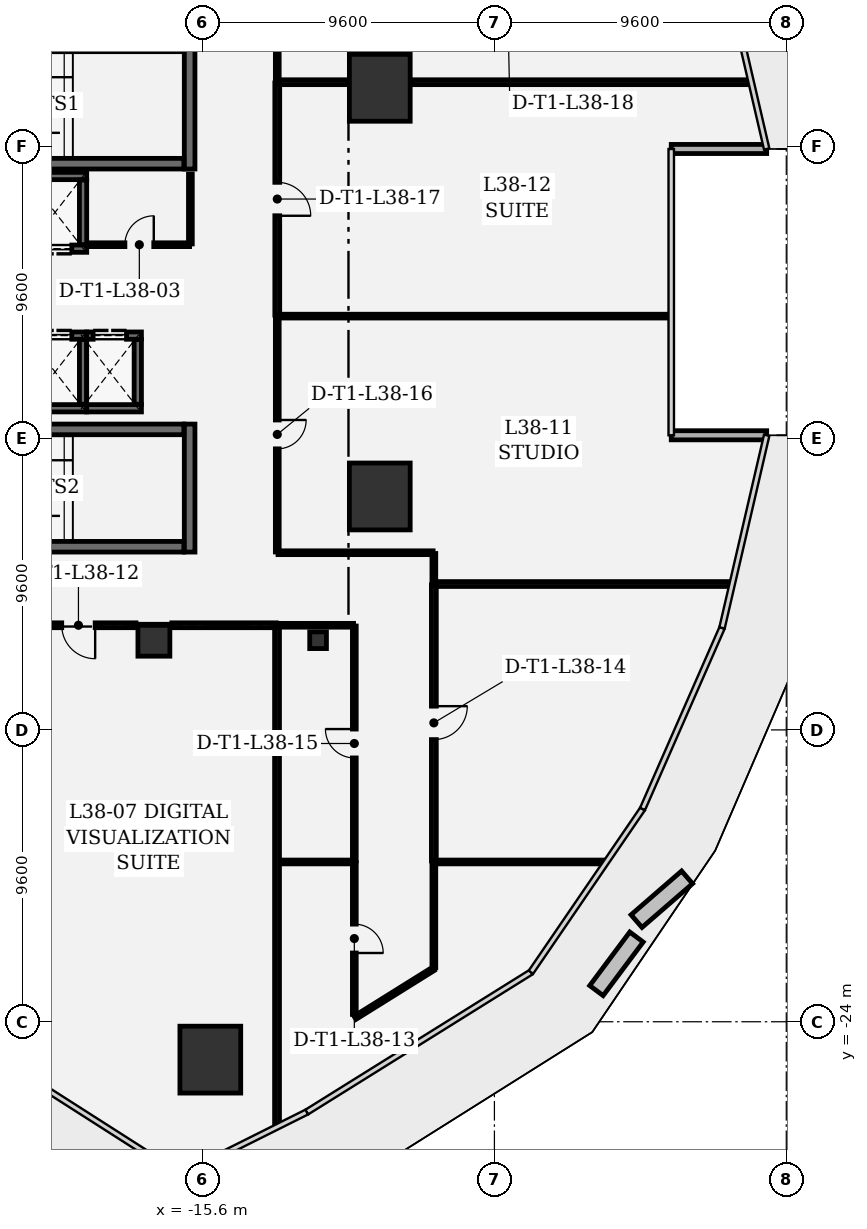
"""IFC4 building model, lengths in metres.
Left out: names, types, materials, properties, quantities, classifications, styles, units other than length and angle.
Written with IfcOpenShell. Run it as: python <this file> out.ifc"""

import sys

from ifc_helpers import new_model, si_unit, direction, frame, frame_2d, origin, origin_2d, place, context, subcontext, project, spatial, rectangle, extrude, element, fill, save


model = new_model("IFC4")
c1 = context("Model", 3, precision=1e-05, world=origin(), true_north=direction((0.0, 1.0)))
c2 = subcontext(c1, "Body", "Model", "MODEL_VIEW")
j1 = project(units=[si_unit("LENGTHUNIT", "METRE"), si_unit("PLANEANGLEUNIT", "RADIAN")], contexts=[c1])
p1 = place(None, origin())
s1 = spatial("IfcSite", under=j1, at=p1, CompositionType="ELEMENT")
p2 = place(p1, origin())
s2 = spatial("IfcBuilding", under=s1, at=p2, CompositionType="ELEMENT")
p3 = place(p2, frame((0.0, 0.0, 166.5)))
s3 = spatial("IfcBuildingStorey", under=s2, at=p3, CompositionType="ELEMENT", Elevation=166.5)
for number, where, z_axis, x_axis in (
    (1, (-15.344, -25.246, 0.0), (0.0, 0.0, 1.0), (1.0, 0.0, 0.0)),
    (2, (-9.77, -6.721, 0.0), (0.0, 0.0, 1.0), (1.0, 0.0, 0.0)),
    (3, (-9.77, 6.721, 0.0), (0.0, 0.0, 1.0), (1.0, 0.0, 0.0)),
):
    element("IfcColumn", number, at=place(p3, frame(where, z_axis=z_axis, x_axis=x_axis)), inside=s3, PredefinedType="COLUMN", context=c2, shape_type="SweptSolid", body=[
        extrude(rectangle(XDim=2.0, YDim=2.2, at=origin_2d()), origin(), (0.0, 0.0, 1.0), 4.05),
    ])
p4 = place(p3, frame((-17.2, -11.45, 0.0), z_axis=(0.0, 0.0, 1.0), x_axis=(1.0, 0.0, 0.0)))
e4 = element("IfcColumn", 4, at=p4, inside=s3, PredefinedType="COLUMN", context=c2, shape_type="SweptSolid", body=[
    extrude(rectangle(XDim=1.05, YDim=1.05, at=origin_2d()), origin(), (0.0, 0.0, 1.0), 4.05),
])
p5 = place(p3, frame((-11.8, -11.45, 0.0), z_axis=(0.0, 0.0, 1.0), x_axis=(1.0, 0.0, 0.0)))
e5 = element("IfcColumn", 5, at=p5, inside=s3, PredefinedType="COLUMN", context=c2, shape_type="SweptSolid", body=[
    extrude(rectangle(XDim=0.55, YDim=0.55, at=origin_2d()), origin(), (0.0, 0.0, 1.0), 4.05),
])
for number, where, z_axis, x_axis in (
    (6, (2.955, -4.709, 0.0), (0.0, 0.0, 1.0), (-1.0, 0.0, 0.0)),
    (7, (-0.184, 4.709, 0.0), (0.0, 0.0, 1.0), (1.0, 0.0, 0.0)),
):
    element("IfcWall", number, at=place(p3, frame(where, z_axis=z_axis, x_axis=x_axis)), inside=s3, PredefinedType="SOLIDWALL", context=c2, shape_type="SweptSolid", body=[
        extrude(rectangle(XDim=3.139, YDim=0.3, at=frame_2d((1.57, 0.0))), origin(), (0.0, 0.0, 1.0), 3.78),
    ])
p6 = place(p3, frame((-16.025, 4.05, 0.0), z_axis=(0.0, 0.0, 1.0), x_axis=(0.0, 1.0, 0.0)))
e8 = element("IfcWall", 8, at=p6, inside=s3, PredefinedType="SHEAR", context=c2, shape_type="SweptSolid", body=[
    extrude(rectangle(XDim=4.21, YDim=0.35, at=frame_2d((2.105, 0.0))), origin(), (0.0, 0.0, 1.0), 3.78),
])
p7 = place(p3, frame((-24.335, 4.225, 0.0), z_axis=(0.0, 0.0, 1.0), x_axis=(1.0, 0.0, 0.0)))
e9 = element("IfcWall", 9, at=p7, inside=s3, PredefinedType="SHEAR", context=c2, shape_type="SweptSolid", body=[
    extrude(rectangle(XDim=8.12, YDim=0.35, at=frame_2d((4.06, 0.0))), origin(), (0.0, 0.0, 1.0), 3.78),
])
p8 = place(p3, frame((-16.025, -8.55, 0.0), z_axis=(0.0, 0.0, 1.0), x_axis=(0.0, 1.0, 0.0)))
e10 = element("IfcWall", 10, at=p8, inside=s3, PredefinedType="SHEAR", context=c2, shape_type="SweptSolid", body=[
    extrude(rectangle(XDim=4.21, YDim=0.35, at=frame_2d((2.105, 0.0))), origin(), (0.0, 0.0, 1.0), 3.78),
])
p9 = place(p3, frame((-24.335, -8.375, 0.0), z_axis=(0.0, 0.0, 1.0), x_axis=(1.0, 0.0, 0.0)))
e11 = element("IfcWall", 11, at=p9, inside=s3, PredefinedType="SHEAR", context=c2, shape_type="SweptSolid", body=[
    extrude(rectangle(XDim=8.12, YDim=0.35, at=frame_2d((4.06, 0.0))), origin(), (0.0, 0.0, 1.0), 3.78),
])
p10 = place(p9, frame((0.28, 0.0, 0.0)))
e12 = element("IfcOpeningElement", 12, at=p10, cuts=e11, PredefinedType="OPENING", context=c2, shape_type="SweptSolid", body=[
    extrude(rectangle(XDim=1.1, YDim=2.2, at=frame_2d((0.55, 1.1))), frame((0.0, 0.185, 0.0), z_axis=(0.0, -1.0, 0.0), x_axis=(1.0, 0.0, 0.0)), (0.0, 0.0, 1.0), 0.37),
])
p11 = place(p3, frame((-16.215, -4.515, 0.0), z_axis=(0.0, 0.0, 1.0), x_axis=(-1.0, 0.0, 0.0)))
e13 = element("IfcWall", 13, at=p11, inside=s3, PredefinedType="SHEAR", context=c2, shape_type="SweptSolid", body=[
    extrude(rectangle(XDim=8.12, YDim=0.35, at=frame_2d((4.06, 0.0))), origin(), (0.0, 0.0, 1.0), 3.78),
])
p12 = place(p3, frame((-19.41, 1.43, 0.0), z_axis=(0.0, 0.0, 1.0), x_axis=(-1.0, 0.0, 0.0)))
e14 = element("IfcWall", 14, at=p12, inside=s3, PredefinedType="SHEAR", context=c2, shape_type="SweptSolid", body=[
    extrude(rectangle(XDim=2.08, YDim=0.24, at=frame_2d((1.04, 0.0))), origin(), (0.0, 0.0, 1.0), 3.78),
])
p13 = place(p12, frame((0.49, 0.0, 0.0)))
e15 = element("IfcOpeningElement", 15, at=p13, cuts=e14, PredefinedType="OPENING", context=c2, shape_type="SweptSolid", body=[
    extrude(rectangle(XDim=1.1, YDim=2.2, at=frame_2d((0.55, 1.1))), frame((0.0, 0.13, 0.0), z_axis=(0.0, -1.0, 0.0), x_axis=(1.0, 0.0, 0.0)), (0.0, 0.0, 1.0), 0.26),
])
p14 = place(p3, frame((-21.49, 3.82, 0.0), z_axis=(0.0, 0.0, 1.0), x_axis=(1.0, 0.0, 0.0)))
e16 = element("IfcWall", 16, at=p14, inside=s3, PredefinedType="SHEAR", context=c2, shape_type="SweptSolid", body=[
    extrude(rectangle(XDim=2.08, YDim=0.24, at=frame_2d((1.04, 0.0))), origin(), (0.0, 0.0, 1.0), 3.78),
])
p15 = place(p3, frame((-19.53, 3.688, 0.0), z_axis=(0.0, 0.0, 1.0), x_axis=(0.0, -1.0, 0.0)))
e17 = element("IfcWall", 17, at=p15, inside=s3, PredefinedType="SHEAR", context=c2, shape_type="SweptSolid", body=[
    extrude(rectangle(XDim=2.126, YDim=0.24, at=frame_2d((1.063, 0.0))), origin(), (0.0, 0.0, 1.0), 3.78),
])
p16 = place(p3, frame((-19.41, -3.82, 0.0), z_axis=(0.0, 0.0, 1.0), x_axis=(-1.0, 0.0, 0.0)))
e18 = element("IfcWall", 18, at=p16, inside=s3, PredefinedType="SHEAR", context=c2, shape_type="SweptSolid", body=[
    extrude(rectangle(XDim=2.08, YDim=0.24, at=frame_2d((1.04, 0.0))), origin(), (0.0, 0.0, 1.0), 3.78),
])
p17 = place(p3, frame((-21.49, -1.43, 0.0), z_axis=(0.0, 0.0, 1.0), x_axis=(1.0, 0.0, 0.0)))
e19 = element("IfcWall", 19, at=p17, inside=s3, PredefinedType="SHEAR", context=c2, shape_type="SweptSolid", body=[
    extrude(rectangle(XDim=2.08, YDim=0.24, at=frame_2d((1.04, 0.0))), origin(), (0.0, 0.0, 1.0), 3.78),
])
p18 = place(p17, frame((0.49, 0.0, 0.0)))
e20 = element("IfcOpeningElement", 20, at=p18, cuts=e19, PredefinedType="OPENING", context=c2, shape_type="SweptSolid", body=[
    extrude(rectangle(XDim=1.1, YDim=2.2, at=frame_2d((0.55, 1.1))), frame((0.0, 0.13, 0.0), z_axis=(0.0, -1.0, 0.0), x_axis=(1.0, 0.0, 0.0)), (0.0, 0.0, 1.0), 0.26),
])
p19 = place(p3, frame((-19.53, -1.562, 0.0), z_axis=(0.0, 0.0, 1.0), x_axis=(0.0, -1.0, 0.0)))
e21 = element("IfcWall", 21, at=p19, inside=s3, PredefinedType="SHEAR", context=c2, shape_type="SweptSolid", body=[
    extrude(rectangle(XDim=2.126, YDim=0.24, at=frame_2d((1.063, 0.0))), origin(), (0.0, 0.0, 1.0), 3.78),
])
p20 = place(p3, frame((-17.61, -3.82, 0.0), z_axis=(0.0, 0.0, 1.0), x_axis=(-1.0, 0.0, 0.0)))
e22 = element("IfcWall", 22, at=p20, inside=s3, PredefinedType="SHEAR", context=c2, shape_type="SweptSolid", body=[
    extrude(rectangle(XDim=1.8, YDim=0.24, at=frame_2d((0.9, 0.0))), origin(), (0.0, 0.0, 1.0), 3.78),
])
p21 = place(p3, frame((-19.41, -1.43, 0.0), z_axis=(0.0, 0.0, 1.0), x_axis=(1.0, 0.0, 0.0)))
e23 = element("IfcWall", 23, at=p21, inside=s3, PredefinedType="SHEAR", context=c2, shape_type="SweptSolid", body=[
    extrude(rectangle(XDim=1.8, YDim=0.24, at=frame_2d((0.9, 0.0))), origin(), (0.0, 0.0, 1.0), 3.78),
])
p22 = place(p21, frame((0.21, 0.0, 0.0)))
e24 = element("IfcOpeningElement", 24, at=p22, cuts=e23, PredefinedType="OPENING", context=c2, shape_type="SweptSolid", body=[
    extrude(rectangle(XDim=1.1, YDim=2.2, at=frame_2d((0.55, 1.1))), frame((0.0, 0.13, 0.0), z_axis=(0.0, -1.0, 0.0), x_axis=(1.0, 0.0, 0.0)), (0.0, 0.0, 1.0), 0.26),
])
p23 = place(p3, frame((-17.73, -1.562, 0.0), z_axis=(0.0, 0.0, 1.0), x_axis=(0.0, -1.0, 0.0)))
e25 = element("IfcWall", 25, at=p23, inside=s3, PredefinedType="SHEAR", context=c2, shape_type="SweptSolid", body=[
    extrude(rectangle(XDim=2.126, YDim=0.24, at=frame_2d((1.063, 0.0))), origin(), (0.0, 0.0, 1.0), 3.78),
])
p24 = place(p3, frame((-19.334, 1.56, 0.0), z_axis=(0.0, 0.0, 1.0), x_axis=(1.0, 0.0, 0.0)))
e26 = element("IfcWall", 26, at=p24, inside=s3, PredefinedType="PARTITIONING", context=c2, shape_type="SweptSolid", body=[
    extrude(rectangle(XDim=3.309, YDim=0.125, at=frame_2d((1.654, 0.0))), origin(), (0.0, 0.0, 1.0), 3.78),
])
p25 = place(p24, frame((1.179, 0.0, 0.0)))
e27 = element("IfcOpeningElement", 27, at=p25, cuts=e26, PredefinedType="OPENING", context=c2, shape_type="SweptSolid", body=[
    extrude(rectangle(XDim=0.95, YDim=2.15, at=frame_2d((0.475, 1.075))), frame((0.0, 0.073, 0.0), z_axis=(0.0, -1.0, 0.0), x_axis=(1.0, 0.0, 0.0)), (0.0, 0.0, 1.0), 0.145),
])
p26 = place(p3, frame((-16.0, 1.585, 0.0), z_axis=(0.0, 0.0, 1.0), x_axis=(0.0, 1.0, 0.0)))
e28 = element("IfcWall", 28, at=p26, inside=s3, PredefinedType="PARTITIONING", context=c2, shape_type="SweptSolid", body=[
    extrude(rectangle(XDim=2.302, YDim=0.125, at=frame_2d((1.151, 0.0))), origin(), (0.0, 0.0, 1.0), 3.78),
])
p27 = place(p3, frame((-17.79, -10.958, 0.0), z_axis=(0.0, 0.0, 1.0), x_axis=(-1.0, 0.0, 0.0)))
e29 = element("IfcWall", 29, at=p27, inside=s3, PredefinedType="PARTITIONING", context=c2, shape_type="SweptSolid", body=[
    extrude(rectangle(XDim=3.783, YDim=0.16, at=frame_2d((1.892, 0.0))), origin(), (0.0, 0.0, 1.0), 3.78),
])
p28 = place(p27, frame((1.342, 0.0, 0.0)))
e30 = element("IfcOpeningElement", 30, at=p28, cuts=e29, PredefinedType="OPENING", context=c2, shape_type="SweptSolid", body=[
    extrude(rectangle(XDim=1.1, YDim=2.15, at=frame_2d((0.55, 1.075))), frame((0.0, 0.09, 0.0), z_axis=(0.0, -1.0, 0.0), x_axis=(1.0, 0.0, 0.0)), (0.0, 0.0, 1.0), 0.18),
])
p29 = place(p3, frame((-13.15, -27.379, 0.0), z_axis=(0.0, 0.0, 1.0), x_axis=(0.0, 1.0, 0.0)))
e31 = element("IfcWall", 31, at=p29, inside=s3, PredefinedType="PARTITIONING", context=c2, shape_type="SweptSolid", body=[
    extrude(rectangle(XDim=16.396, YDim=0.16, at=frame_2d((8.198, 0.0))), origin(), (0.0, 0.0, 1.0), 2.9),
])
p30 = place(p3, frame((-13.175, -10.958, 0.0), z_axis=(0.0, 0.0, 1.0), x_axis=(-1.0, 0.0, 0.0)))
e32 = element("IfcWall", 32, at=p30, inside=s3, PredefinedType="PARTITIONING", context=c2, shape_type="SweptSolid", body=[
    extrude(rectangle(XDim=3.435, YDim=0.16, at=frame_2d((1.718, 0.0))), origin(), (0.0, 0.0, 1.0), 2.895),
])
p31 = place(p3, frame((-2.4, -18.744, 0.0), z_axis=(0.0, 0.0, 1.0), x_axis=(-1.0, 0.0, 0.0)))
e33 = element("IfcWall", 33, at=p31, inside=s3, PredefinedType="PARTITIONING", context=c2, shape_type="SweptSolid", body=[
    extrude(rectangle(XDim=5.567, YDim=0.125, at=frame_2d((2.783, 0.0))), origin(), (0.0, 0.0, 1.0), 3.78),
])
p32 = place(p3, frame((-7.992, -22.226, 0.0), z_axis=(0.0, 0.0, 1.0), x_axis=(0.0, 1.0, 0.0)))
e34 = element("IfcWall", 34, at=p32, inside=s3, PredefinedType="PARTITIONING", context=c2, shape_type="SweptSolid", body=[
    extrude(rectangle(XDim=3.457, YDim=0.125, at=frame_2d((1.728, 0.0))), origin(), (0.0, 0.0, 1.0), 3.78),
])
p33 = place(p3, frame((-10.587, -23.87, 0.0), z_axis=(0.0, 0.0, 1.0), x_axis=(0.848364341402, 0.529412829688, 0.0)))
e35 = element("IfcWall", 35, at=p33, inside=s3, PredefinedType="PARTITIONING", context=c2, shape_type="SweptSolid", body=[
    extrude(rectangle(XDim=3.033, YDim=0.125, at=frame_2d((1.517, 0.0))), origin(), (0.0, 0.0, 1.0), 3.78),
])
p34 = place(p3, frame((-10.608, -18.769, 0.0), z_axis=(0.0, 0.0, 1.0), x_axis=(0.0, -1.0, 0.0)))
e36 = element("IfcWall", 36, at=p34, inside=s3, PredefinedType="PARTITIONING", context=c2, shape_type="SweptSolid", body=[
    extrude(rectangle(XDim=4.989, YDim=0.125, at=frame_2d((2.494, 0.0))), origin(), (0.0, 0.0, 1.0), 3.78),
])
p35 = place(p34, frame((2.019, 0.0, 0.0)))
e37 = element("IfcOpeningElement", 37, at=p35, cuts=e36, PredefinedType="OPENING", context=c2, shape_type="SweptSolid", body=[
    extrude(rectangle(XDim=0.95, YDim=2.15, at=frame_2d((0.475, 1.075))), frame((0.0, 0.073, 0.0), z_axis=(0.0, -1.0, 0.0), x_axis=(1.0, 0.0, 0.0)), (0.0, 0.0, 1.0), 0.145),
])
p36 = place(p3, frame((-10.633, -18.744, 0.0), z_axis=(0.0, 0.0, 1.0), x_axis=(-1.0, 0.0, 0.0)))
e38 = element("IfcWall", 38, at=p36, inside=s3, PredefinedType="PARTITIONING", context=c2, shape_type="SweptSolid", body=[
    extrude(rectangle(XDim=2.407, YDim=0.125, at=frame_2d((1.204, 0.0))), origin(), (0.0, 0.0, 1.0), 3.78),
])
p37 = place(p3, frame((1.741, -9.602, 0.0), z_axis=(0.0, 0.0, 1.0), x_axis=(-1.0, 0.0, 0.0)))
e39 = element("IfcWall", 39, at=p37, inside=s3, PredefinedType="PARTITIONING", context=c2, shape_type="SweptSolid", body=[
    extrude(rectangle(XDim=9.708, YDim=0.16, at=frame_2d((4.854, 0.0))), origin(), (0.0, 0.0, 1.0), 3.78),
])
p38 = place(p3, frame((-7.992, -9.627, 0.0), z_axis=(0.0, 0.0, 1.0), x_axis=(0.0, -1.0, 0.0)))
e40 = element("IfcWall", 40, at=p38, inside=s3, PredefinedType="PARTITIONING", context=c2, shape_type="SweptSolid", body=[
    extrude(rectangle(XDim=9.084, YDim=0.16, at=frame_2d((4.542, 0.0))), origin(), (0.0, 0.0, 1.0), 3.78),
])
p39 = place(p38, frame((3.992, 0.0, 0.0)))
e41 = element("IfcOpeningElement", 41, at=p39, cuts=e40, PredefinedType="OPENING", context=c2, shape_type="SweptSolid", body=[
    extrude(rectangle(XDim=1.1, YDim=2.15, at=frame_2d((0.55, 1.075))), frame((0.0, 0.09, 0.0), z_axis=(0.0, -1.0, 0.0), x_axis=(1.0, 0.0, 0.0)), (0.0, 0.0, 1.0), 0.18),
])
p40 = place(p3, frame((-10.608, -18.711, 0.0), z_axis=(0.0, 0.0, 1.0), x_axis=(0.0, 1.0, 0.0)))
e42 = element("IfcWall", 42, at=p40, inside=s3, PredefinedType="PARTITIONING", context=c2, shape_type="SweptSolid", body=[
    extrude(rectangle(XDim=7.728, YDim=0.125, at=frame_2d((3.864, 0.0))), origin(), (0.0, 0.0, 1.0), 2.9),
])
p41 = place(p40, frame((3.389, 0.0, 0.0)))
e43 = element("IfcOpeningElement", 43, at=p41, cuts=e42, PredefinedType="OPENING", context=c2, shape_type="SweptSolid", body=[
    extrude(rectangle(XDim=0.95, YDim=2.15, at=frame_2d((0.475, 1.075))), frame((0.0, 0.073, 0.0), z_axis=(0.0, -1.0, 0.0), x_axis=(1.0, 0.0, 0.0)), (0.0, 0.0, 1.0), 0.145),
])
p42 = place(p3, frame((-10.633, -10.958, 0.0), z_axis=(0.0, 0.0, 1.0), x_axis=(-1.0, 0.0, 0.0)))
e44 = element("IfcWall", 44, at=p42, inside=s3, PredefinedType="PARTITIONING", context=c2, shape_type="SweptSolid", body=[
    extrude(rectangle(XDim=2.484, YDim=0.125, at=frame_2d((1.242, 0.0))), origin(), (0.0, 0.0, 1.0), 3.78),
])
p43 = place(p3, frame((-0.264, -0.789, 0.0), z_axis=(0.0, 0.0, 1.0), x_axis=(-1.0, 0.0, 0.0)))
e45 = element("IfcWall", 45, at=p43, inside=s3, PredefinedType="PARTITIONING", context=c2, shape_type="SweptSolid", body=[
    extrude(rectangle(XDim=12.853, YDim=0.125, at=frame_2d((6.427, 0.0))), origin(), (0.0, 0.0, 1.0), 3.78),
])
p44 = place(p3, frame((-13.142, -0.814, 0.0), z_axis=(0.0, 0.0, 1.0), x_axis=(0.0, -1.0, 0.0)))
e46 = element("IfcWall", 46, at=p44, inside=s3, PredefinedType="PARTITIONING", context=c2, shape_type="SweptSolid", body=[
    extrude(rectangle(XDim=7.733, YDim=0.125, at=frame_2d((3.866, 0.0))), origin(), (0.0, 0.0, 1.0), 3.78),
])
p45 = place(p44, frame((3.391, 0.0, 0.0)))
e47 = element("IfcOpeningElement", 47, at=p45, cuts=e46, PredefinedType="OPENING", context=c2, shape_type="SweptSolid", body=[
    extrude(rectangle(XDim=0.95, YDim=2.15, at=frame_2d((0.475, 1.075))), frame((0.0, 0.073, 0.0), z_axis=(0.0, -1.0, 0.0), x_axis=(1.0, 0.0, 0.0)), (0.0, 0.0, 1.0), 0.145),
])
p46 = place(p3, frame((-13.117, -8.572, 0.0), z_axis=(0.0, 0.0, 1.0), x_axis=(1.0, 0.0, 0.0)))
e48 = element("IfcWall", 48, at=p46, inside=s3, PredefinedType="PARTITIONING", context=c2, shape_type="SweptSolid", body=[
    extrude(rectangle(XDim=5.1, YDim=0.125, at=frame_2d((2.55, 0.0))), origin(), (0.0, 0.0, 1.0), 2.895),
])
p47 = place(p3, frame((-7.992, -8.597, 0.0), z_axis=(0.0, 0.0, 1.0), x_axis=(0.0, -1.0, 0.0)))
e49 = element("IfcWall", 49, at=p47, inside=s3, PredefinedType="PARTITIONING", context=c2, shape_type="SweptSolid", body=[
    extrude(rectangle(XDim=0.972, YDim=0.125, at=frame_2d((0.486, 0.0))), origin(), (0.0, 0.0, 1.0), 3.78),
])
p48 = place(p3, frame((2.366, 6.905, 0.0), z_axis=(0.0, 0.0, 1.0), x_axis=(-1.0, 0.0, 0.0)))
e50 = element("IfcWall", 50, at=p48, inside=s3, PredefinedType="PARTITIONING", context=c2, shape_type="SweptSolid", body=[
    extrude(rectangle(XDim=11.072, YDim=0.16, at=frame_2d((5.536, 0.0))), origin(), (0.0, 0.0, 1.0), 3.78),
])
p49 = place(p3, frame((-10.835, 6.905, 0.0), z_axis=(0.0, 0.0, 1.0), x_axis=(-1.0, 0.0, 0.0)))
e51 = element("IfcWall", 51, at=p49, inside=s3, PredefinedType="PARTITIONING", context=c2, shape_type="SweptSolid", body=[
    extrude(rectangle(XDim=2.282, YDim=0.16, at=frame_2d((1.141, 0.0))), origin(), (0.0, 0.0, 1.0), 3.78),
])
p50 = place(p3, frame((-13.142, 6.88, 0.0), z_axis=(0.0, 0.0, 1.0), x_axis=(0.0, -1.0, 0.0)))
e52 = element("IfcWall", 52, at=p50, inside=s3, PredefinedType="PARTITIONING", context=c2, shape_type="SweptSolid", body=[
    extrude(rectangle(XDim=7.636, YDim=0.16, at=frame_2d((3.818, 0.0))), origin(), (0.0, 0.0, 1.0), 3.78),
])
p51 = place(p50, frame((3.268, 0.0, 0.0)))
e53 = element("IfcOpeningElement", 53, at=p51, cuts=e52, PredefinedType="OPENING", context=c2, shape_type="SweptSolid", body=[
    extrude(rectangle(XDim=1.1, YDim=2.15, at=frame_2d((0.55, 1.075))), frame((0.0, 0.09, 0.0), z_axis=(0.0, -1.0, 0.0), x_axis=(1.0, 0.0, 0.0)), (0.0, 0.0, 1.0), 0.18),
])
p52 = place(p3, frame((-13.142, 8.287, 0.0), z_axis=(0.0, 0.0, 1.0), x_axis=(0.0, -1.0, 0.0)))
e54 = element("IfcWall", 54, at=p52, inside=s3, PredefinedType="PARTITIONING", context=c2, shape_type="SweptSolid", body=[
    extrude(rectangle(XDim=1.349, YDim=0.125, at=frame_2d((0.674, 0.0))), origin(), (0.0, 0.0, 1.0), 3.78),
])
p53 = place(p13, origin())
e55 = element("IfcDoor", 55, at=p53, inside=s3, OperationType="DOUBLE_DOOR_SLIDING", PredefinedType="DOOR", context=c2, shape_type="SweptSolid", body=[
    extrude(rectangle(XDim=1.1, YDim=2.2, at=frame_2d((0.55, 1.1))), frame((0.0, 0.025, 0.0), z_axis=(0.0, -1.0, 0.0), x_axis=(1.0, 0.0, 0.0)), (0.0, 0.0, 1.0), 0.05),
])
fill(e15, e55)
p54 = place(p18, origin())
e56 = element("IfcDoor", 56, at=p54, inside=s3, OperationType="DOUBLE_DOOR_SLIDING", PredefinedType="DOOR", context=c2, shape_type="SweptSolid", body=[
    extrude(rectangle(XDim=1.1, YDim=2.2, at=frame_2d((0.55, 1.1))), frame((0.0, 0.025, 0.0), z_axis=(0.0, -1.0, 0.0), x_axis=(1.0, 0.0, 0.0)), (0.0, 0.0, 1.0), 0.05),
])
fill(e20, e56)
p55 = place(p22, origin())
e57 = element("IfcDoor", 57, at=p55, inside=s3, OperationType="DOUBLE_DOOR_SLIDING", PredefinedType="DOOR", context=c2, shape_type="SweptSolid", body=[
    extrude(rectangle(XDim=1.1, YDim=2.2, at=frame_2d((0.55, 1.1))), frame((0.0, 0.025, 0.0), z_axis=(0.0, -1.0, 0.0), x_axis=(1.0, 0.0, 0.0)), (0.0, 0.0, 1.0), 0.05),
])
fill(e24, e57)
p56 = place(p25, origin())
e58 = element("IfcDoor", 58, at=p56, inside=s3, OperationType="SINGLE_SWING_RIGHT", PredefinedType="DOOR", context=c2, shape_type="SweptSolid", body=[
    extrude(rectangle(XDim=0.95, YDim=2.15, at=frame_2d((0.475, 1.075))), frame((0.0, 0.025, 0.0), z_axis=(0.0, -1.0, 0.0), x_axis=(1.0, 0.0, 0.0)), (0.0, 0.0, 1.0), 0.05),
])
fill(e27, e58)
p57 = place(p28, origin())
e59 = element("IfcDoor", 59, at=p57, inside=s3, OperationType="SINGLE_SWING_LEFT", PredefinedType="DOOR", context=c2, shape_type="SweptSolid", body=[
    extrude(rectangle(XDim=1.1, YDim=2.15, at=frame_2d((0.55, 1.075))), frame((0.0, 0.025, 0.0), z_axis=(0.0, -1.0, 0.0), x_axis=(1.0, 0.0, 0.0)), (0.0, 0.0, 1.0), 0.05),
])
fill(e30, e59)
p58 = place(p35, origin())
e60 = element("IfcDoor", 60, at=p58, inside=s3, OperationType="SINGLE_SWING_RIGHT", PredefinedType="DOOR", context=c2, shape_type="SweptSolid", body=[
    extrude(rectangle(XDim=0.95, YDim=2.15, at=frame_2d((0.475, 1.075))), frame((0.0, 0.025, 0.0), z_axis=(0.0, -1.0, 0.0), x_axis=(1.0, 0.0, 0.0)), (0.0, 0.0, 1.0), 0.05),
])
fill(e37, e60)
p59 = place(p39, origin())
e61 = element("IfcDoor", 61, at=p59, inside=s3, OperationType="SINGLE_SWING_LEFT", PredefinedType="DOOR", context=c2, shape_type="SweptSolid", body=[
    extrude(rectangle(XDim=1.1, YDim=2.15, at=frame_2d((0.55, 1.075))), frame((0.0, 0.025, 0.0), z_axis=(0.0, -1.0, 0.0), x_axis=(1.0, 0.0, 0.0)), (0.0, 0.0, 1.0), 0.05),
])
fill(e41, e61)
p60 = place(p41, origin())
e62 = element("IfcDoor", 62, at=p60, inside=s3, OperationType="SINGLE_SWING_RIGHT", PredefinedType="DOOR", context=c2, shape_type="SweptSolid", body=[
    extrude(rectangle(XDim=0.95, YDim=2.15, at=frame_2d((0.475, 1.075))), frame((0.0, 0.025, 0.0), z_axis=(0.0, -1.0, 0.0), x_axis=(1.0, 0.0, 0.0)), (0.0, 0.0, 1.0), 0.05),
])
fill(e43, e62)
p61 = place(p45, origin())
e63 = element("IfcDoor", 63, at=p61, inside=s3, OperationType="SINGLE_SWING_LEFT", PredefinedType="DOOR", context=c2, shape_type="SweptSolid", body=[
    extrude(rectangle(XDim=0.95, YDim=2.15, at=frame_2d((0.475, 1.075))), frame((0.0, 0.025, 0.0), z_axis=(0.0, -1.0, 0.0), x_axis=(1.0, 0.0, 0.0)), (0.0, 0.0, 1.0), 0.05),
])
fill(e47, e63)
p62 = place(p51, origin())
e64 = element("IfcDoor", 64, at=p62, inside=s3, OperationType="SINGLE_SWING_RIGHT", PredefinedType="DOOR", context=c2, shape_type="SweptSolid", body=[
    extrude(rectangle(XDim=1.1, YDim=2.15, at=frame_2d((0.55, 1.075))), frame((0.0, 0.025, 0.0), z_axis=(0.0, -1.0, 0.0), x_axis=(1.0, 0.0, 0.0)), (0.0, 0.0, 1.0), 0.05),
])
fill(e53, e64)
save(model, sys.argv[1])
